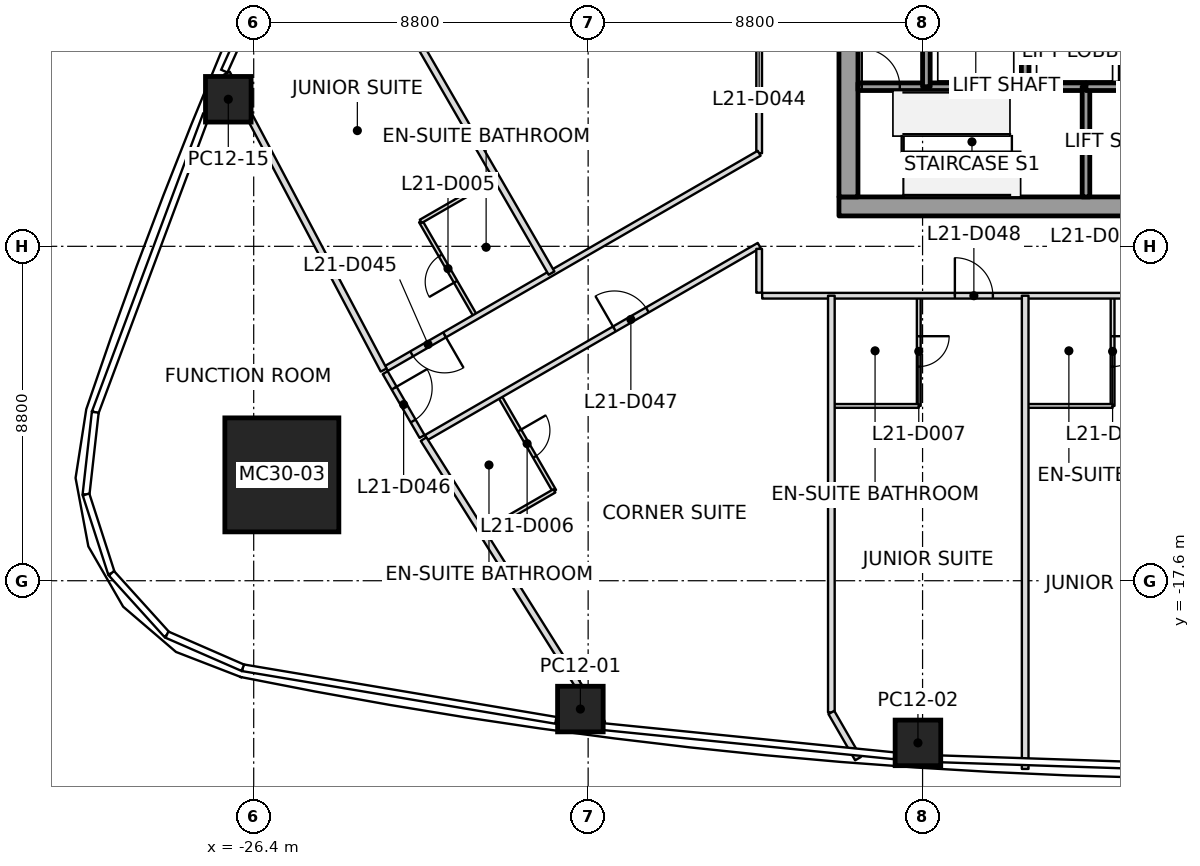
"""IFC4 building model, lengths in metres.
Left out: names, types, materials, properties, quantities, classifications, styles, units other than length and angle.
Written with IfcOpenShell. Run it as: python <this file> out.ifc"""

import sys

from ifc_helpers import new_model, si_unit, direction, frame, frame_2d, origin, origin_2d, place, context, subcontext, project, spatial, rectangle, extrude, element, fill, save


model = new_model("IFC4")
c1 = context("Model", 3, precision=1e-05, world=origin(), true_north=direction((0.0, 1.0)))
c2 = subcontext(c1, "Body", "Model", "MODEL_VIEW")
j1 = project(units=[si_unit("LENGTHUNIT", "METRE"), si_unit("PLANEANGLEUNIT", "RADIAN")], contexts=[c1])
p1 = place(None, origin())
s1 = spatial("IfcSite", under=j1, at=p1, CompositionType="ELEMENT")
p2 = place(p1, origin())
s2 = spatial("IfcBuilding", under=s1, at=p2, CompositionType="ELEMENT")
p3 = place(p2, frame((0.0, 0.0, 99.8)))
s3 = spatial("IfcBuildingStorey", under=s2, at=p3, CompositionType="ELEMENT", Elevation=99.8)
p4 = place(p3, frame((-25.659, -14.814, 0.0), z_axis=(0.030466109479, 0.017607037296, 0.999380712447), x_axis=(0.999535800346, -0.000536667047, -0.03046138236)))
e1 = element("IfcColumn", 1, at=p4, inside=s3, PredefinedType="COLUMN", context=c2, shape_type="SweptSolid", body=[
    extrude(rectangle(XDim=3.0, YDim=3.0, at=origin_2d()), origin(), (0.0, 0.0, 1.0), 3.702),
])
p5 = place(p3, frame((-17.804, -20.977, 0.0), z_axis=(0.019196808933, 0.011346567479, 0.99975133805), x_axis=(-0.99096351093, 0.132982750018, 0.01751879569)))
e2 = element("IfcColumn", 2, at=p5, inside=s3, PredefinedType="COLUMN", context=c2, shape_type="SweptSolid", body=[
    extrude(rectangle(XDim=1.2, YDim=1.2, at=origin_2d()), origin(), (0.0, 0.0, 1.0), 3.701),
])
p6 = place(p3, frame((-8.922, -21.867, 0.0), z_axis=(0.009632635025, 0.012073782257, 0.999880710947), x_axis=(-0.997737791534, 0.066646321699, 0.008807221425)))
e3 = element("IfcColumn", 3, at=p6, inside=s3, PredefinedType="COLUMN", context=c2, shape_type="SweptSolid", body=[
    extrude(rectangle(XDim=1.2, YDim=1.2, at=origin_2d()), origin(), (0.0, 0.0, 1.0), 3.7),
])
p7 = place(p3, frame((-27.069, -4.93, 0.0), z_axis=(0.019394711647, 0.011016723963, 0.999751207528), x_axis=(0.380514646556, 0.924607960976, -0.017570493934)))
e4 = element("IfcColumn", 4, at=p7, inside=s3, PredefinedType="COLUMN", context=c2, shape_type="SweptSolid", body=[
    extrude(rectangle(XDim=1.2, YDim=1.2, at=origin_2d()), origin(), (0.0, 0.0, 1.0), 3.701),
])
p8 = place(p3, frame((-11.0, -7.75, 0.0), z_axis=(0.0, 0.0, 1.0), x_axis=(1.0, 0.0, 0.0)))
e5 = element("IfcWall", 5, at=p8, inside=s3, PredefinedType="SHEAR", context=c2, shape_type="SweptSolid", body=[
    extrude(rectangle(XDim=22.0, YDim=0.5, at=frame_2d((11.0, 0.0))), origin(), (0.0, 0.0, 1.0), 3.7),
])
p9 = place(p8, frame((10.45, 0.0, 0.0)))
e6 = element("IfcOpeningElement", 6, at=p9, cuts=e5, PredefinedType="OPENING", context=c2, shape_type="SweptSolid", body=[
    extrude(rectangle(XDim=1.1, YDim=2.1, at=frame_2d((0.55, 1.05))), frame((0.0, 0.25, 0.0), z_axis=(0.0, -1.0, 0.0), x_axis=(1.0, 0.0, 0.0)), (0.0, 0.0, 1.0), 0.5),
])
p10 = place(p3, frame((-10.75, -7.5, 0.0), z_axis=(0.0, 0.0, 1.0), x_axis=(0.0, 1.0, 0.0)))
e7 = element("IfcWall", 7, at=p10, inside=s3, PredefinedType="SHEAR", context=c2, shape_type="SweptSolid", body=[
    extrude(rectangle(XDim=15.0, YDim=0.5, at=frame_2d((7.5, 0.0))), origin(), (0.0, 0.0, 1.0), 3.7),
])
p11 = place(p10, frame((6.6, 0.0, 0.0)))
e8 = element("IfcOpeningElement", 8, at=p11, cuts=e7, PredefinedType="OPENING", context=c2, shape_type="SweptSolid", body=[
    extrude(rectangle(XDim=1.8, YDim=2.1, at=frame_2d((0.9, 1.05))), frame((0.0, 0.25, 0.0), z_axis=(0.0, -1.0, 0.0), x_axis=(1.0, 0.0, 0.0)), (0.0, 0.0, 1.0), 0.5),
])
p12 = place(p3, frame((-10.5, -4.6, 0.0), z_axis=(0.0, 0.0, 1.0), x_axis=(1.0, 0.0, 0.0)))
e9 = element("IfcWall", 9, at=p12, inside=s3, PredefinedType="SOLIDWALL", context=c2, shape_type="SweptSolid", body=[
    extrude(rectangle(XDim=1.8, YDim=0.2, at=frame_2d((0.9, 0.0))), origin(), (0.0, 0.0, 1.0), 3.55),
])
p13 = place(p12, frame((0.1, 0.0, 0.0)))
e10 = element("IfcOpeningElement", 10, at=p13, cuts=e9, PredefinedType="OPENING", context=c2, shape_type="SweptSolid", body=[
    extrude(rectangle(XDim=1.0, YDim=2.1, at=frame_2d((0.5, 1.05))), frame((0.0, 0.1, 0.0), z_axis=(0.0, -1.0, 0.0), x_axis=(1.0, 0.0, 0.0)), (0.0, 0.0, 1.0), 0.2),
])
p14 = place(p3, frame((-8.7, -4.6, 0.0), z_axis=(0.0, 0.0, 1.0), x_axis=(1.0, 0.0, 0.0)))
e11 = element("IfcWall", 11, at=p14, inside=s3, PredefinedType="SOLIDWALL", context=c2, shape_type="SweptSolid", body=[
    extrude(rectangle(XDim=2.6, YDim=0.2, at=frame_2d((1.3, 0.0))), origin(), (0.0, 0.0, 1.0), 3.55),
])
p15 = place(p3, frame((-8.7, -4.6, 0.0), z_axis=(0.0, 0.0, 1.0), x_axis=(0.0, 1.0, 0.0)))
e12 = element("IfcWall", 12, at=p15, inside=s3, PredefinedType="SOLIDWALL", context=c2, shape_type="SweptSolid", body=[
    extrude(rectangle(XDim=2.8, YDim=0.2, at=frame_2d((1.4, 0.0))), origin(), (0.0, 0.0, 1.0), 3.55),
])
p16 = place(p3, frame((-6.1, -4.6, 0.0), z_axis=(0.0, 0.0, 1.0), x_axis=(1.0, 0.0, 0.0)))
e13 = element("IfcWall", 13, at=p16, inside=s3, PredefinedType="SOLIDWALL", context=c2, shape_type="SweptSolid", body=[
    extrude(rectangle(XDim=1.6, YDim=0.2, at=frame_2d((0.8, 0.0))), origin(), (0.0, 0.0, 1.0), 3.55),
])
p17 = place(p3, frame((-6.1, -4.6, 0.0), z_axis=(0.0, 0.0, 1.0), x_axis=(0.0, 1.0, 0.0)))
e14 = element("IfcWall", 14, at=p17, inside=s3, PredefinedType="SOLIDWALL", context=c2, shape_type="SweptSolid", body=[
    extrude(rectangle(XDim=2.8, YDim=0.2, at=frame_2d((1.4, 0.0))), origin(), (0.0, 0.0, 1.0), 3.55),
])
p18 = place(p3, frame((-4.5, -4.6, 0.0), z_axis=(0.0, 0.0, 1.0), x_axis=(0.0, -1.0, 0.0)))
e15 = element("IfcWall", 15, at=p18, inside=s3, PredefinedType="SOLIDWALL", context=c2, shape_type="SweptSolid", body=[
    extrude(rectangle(XDim=2.9, YDim=0.2, at=frame_2d((1.45, 0.0))), origin(), (0.0, 0.0, 1.0), 3.55),
])
p19 = place(p3, frame((-4.5, -4.6, 0.0), z_axis=(0.0, 0.0, 1.0), x_axis=(1.0, 0.0, 0.0)))
e16 = element("IfcWall", 16, at=p19, inside=s3, PredefinedType="SOLIDWALL", context=c2, shape_type="SweptSolid", body=[
    extrude(rectangle(XDim=1.0, YDim=0.2, at=frame_2d((0.5, 0.0))), origin(), (0.0, 0.0, 1.0), 3.55),
])
p20 = place(p3, frame((-22.98, -12.055, 0.0), z_axis=(0.0, 0.0, 1.0), x_axis=(-0.467349289871, 0.884072757898, 0.0)))
e17 = element("IfcWall", 17, at=p20, inside=s3, PredefinedType="PARTITIONING", context=c2, shape_type="SweptSolid", body=[
    extrude(rectangle(XDim=8.835, YDim=0.175, at=frame_2d((4.417, 0.0))), origin(), (0.0, 0.0, 1.0), 3.0),
])
p21 = place(p3, frame((-18.563, -9.505, 0.0), z_axis=(0.0, 0.0, 1.0), x_axis=(-0.500006767202, 0.866021496703, 0.0)))
e18 = element("IfcWall", 18, at=p21, inside=s3, PredefinedType="PARTITIONING", context=c2, shape_type="SweptSolid", body=[
    extrude(rectangle(XDim=12.587, YDim=0.175, at=frame_2d((6.293, 0.0))), origin(), (0.0, 0.0, 1.0), 2.934),
])
p22 = place(p3, frame((-17.23, -21.355, 0.0), z_axis=(0.0, 0.0, 1.0), x_axis=(-0.53194005048, 0.846782016044, 0.0)))
e19 = element("IfcWall", 19, at=p22, inside=s3, PredefinedType="PARTITIONING", context=c2, shape_type="SweptSolid", body=[
    extrude(rectangle(XDim=8.834, YDim=0.175, at=frame_2d((4.417, 0.0))), origin(), (0.0, 0.0, 1.0), 3.0),
])
p23 = place(p3, frame((-11.2, -10.1, 0.0), z_axis=(0.0, 0.0, 1.0), x_axis=(0.0, -1.0, 0.0)))
e20 = element("IfcWall", 20, at=p23, inside=s3, PredefinedType="PARTITIONING", context=c2, shape_type="SweptSolid", body=[
    extrude(rectangle(XDim=10.967, YDim=0.175, at=frame_2d((5.483, 0.0))), origin(), (0.0, 0.0, 1.0), 3.0),
])
p24 = place(p3, frame((-11.2, -21.067, 0.0), z_axis=(0.0, 0.0, 1.0), x_axis=(0.500068863623, -0.865985641702, 0.0)))
e21 = element("IfcWall", 21, at=p24, inside=s3, PredefinedType="PARTITIONING", context=c2, shape_type="SweptSolid", body=[
    extrude(rectangle(XDim=1.403, YDim=0.175, at=frame_2d((0.702, 0.0))), origin(), (0.0, 0.0, 1.0), 2.934),
])
p25 = place(p3, frame((-6.1, -10.1, 0.0), z_axis=(0.0, 0.0, 1.0), x_axis=(0.0, -1.0, 0.0)))
e22 = element("IfcWall", 22, at=p25, inside=s3, PredefinedType="PARTITIONING", context=c2, shape_type="SweptSolid", body=[
    extrude(rectangle(XDim=12.452, YDim=0.175, at=frame_2d((6.226, 0.0))), origin(), (0.0, 0.0, 1.0), 2.784),
])
p26 = place(p3, frame((-22.94, -12.124, 0.0), z_axis=(0.0, 0.0, 1.0), x_axis=(0.499969367985, -0.866043088465, 0.0)))
e23 = element("IfcWall", 23, at=p26, inside=s3, PredefinedType="PARTITIONING", context=c2, shape_type="SweptSolid", body=[
    extrude(rectangle(XDim=1.94, YDim=0.15, at=frame_2d((0.97, 0.0))), origin(), (0.0, 0.0, 1.0), 2.797),
])
p27 = place(p26, frame((0.47, 0.0, 0.0)))
e24 = element("IfcOpeningElement", 24, at=p27, cuts=e23, PredefinedType="OPENING", context=c2, shape_type="SweptSolid", body=[
    extrude(rectangle(XDim=1.0, YDim=2.1, at=frame_2d((0.5, 1.05))), frame((0.0, 0.075, 0.0), z_axis=(0.0, -1.0, 0.0), x_axis=(1.0, 0.0, 0.0)), (0.0, 0.0, 1.0), 0.15),
])
p28 = place(p3, frame((-13.1, 10.02, 0.0), z_axis=(0.0, 0.0, 1.0), x_axis=(0.0, -1.0, 0.0)))
e25 = element("IfcWall", 25, at=p28, inside=s3, PredefinedType="PARTITIONING", context=c2, shape_type="SweptSolid", body=[
    extrude(rectangle(XDim=16.371, YDim=0.15, at=frame_2d((8.186, 0.0))), origin(), (0.0, 0.0, 1.0), 2.947),
])
p29 = place(p28, frame((2.845, 0.0, 0.0)))
e26 = element("IfcOpeningElement", 26, at=p29, cuts=e25, PredefinedType="OPENING", context=c2, shape_type="SweptSolid", body=[
    extrude(rectangle(XDim=1.0, YDim=2.1, at=frame_2d((0.5, 1.05))), frame((0.0, 0.075, 0.0), z_axis=(0.0, -1.0, 0.0), x_axis=(1.0, 0.0, 0.0)), (0.0, 0.0, 1.0), 0.15),
])
p30 = place(p28, frame((12.271, 0.0, 0.0)))
e27 = element("IfcOpeningElement", 27, at=p30, cuts=e25, PredefinedType="OPENING", context=c2, shape_type="SweptSolid", body=[
    extrude(rectangle(XDim=1.0, YDim=2.1, at=frame_2d((0.5, 1.05))), frame((0.0, 0.075, 0.0), z_axis=(0.0, -1.0, 0.0), x_axis=(1.0, 0.0, 0.0)), (0.0, 0.0, 1.0), 0.15),
])
p31 = place(p3, frame((-13.1, -6.351, 0.0), z_axis=(0.0, 0.0, 1.0), x_axis=(-0.866018341403, -0.500012232204, 0.0)))
e28 = element("IfcWall", 28, at=p31, inside=s3, PredefinedType="PARTITIONING", context=c2, shape_type="SweptSolid", body=[
    extrude(rectangle(XDim=11.328, YDim=0.15, at=frame_2d((5.664, 0.0))), origin(), (0.0, 0.0, 1.0), 2.947),
])
p32 = place(p31, frame((9.559, 0.0, 0.0)))
e29 = element("IfcOpeningElement", 29, at=p32, cuts=e28, PredefinedType="OPENING", context=c2, shape_type="SweptSolid", body=[
    extrude(rectangle(XDim=1.0, YDim=2.1, at=frame_2d((0.5, 1.05))), frame((0.0, 0.075, 0.0), z_axis=(0.0, -1.0, 0.0), x_axis=(1.0, 0.0, 0.0)), (0.0, 0.0, 1.0), 0.15),
])
p33 = place(p3, frame((-21.861, -13.834, 0.0), z_axis=(0.0, 0.0, 1.0), x_axis=(0.866015577098, 0.500017019934, 0.0)))
e30 = element("IfcWall", 30, at=p33, inside=s3, PredefinedType="PARTITIONING", context=c2, shape_type="SweptSolid", body=[
    extrude(rectangle(XDim=10.116, YDim=0.15, at=frame_2d((5.058, 0.0))), origin(), (0.0, 0.0, 1.0), 2.797),
])
p34 = place(p33, frame((5.718, 0.0, 0.0)))
e31 = element("IfcOpeningElement", 31, at=p34, cuts=e30, PredefinedType="OPENING", context=c2, shape_type="SweptSolid", body=[
    extrude(rectangle(XDim=1.0, YDim=2.1, at=frame_2d((0.5, 1.05))), frame((0.0, 0.075, 0.0), z_axis=(0.0, -1.0, 0.0), x_axis=(1.0, 0.0, 0.0)), (0.0, 0.0, 1.0), 0.15),
])
p35 = place(p3, frame((-13.1, -8.867, 0.0), z_axis=(0.0, 0.0, 1.0), x_axis=(0.0, -1.0, 0.0)))
e32 = element("IfcWall", 32, at=p35, inside=s3, PredefinedType="PARTITIONING", context=c2, shape_type="SweptSolid", body=[
    extrude(rectangle(XDim=1.153, YDim=0.15, at=frame_2d((0.576, 0.0))), origin(), (0.0, 0.0, 1.0), 2.797),
])
p36 = place(p3, frame((-13.02, -10.1, 0.0), z_axis=(0.0, 0.0, 1.0), x_axis=(1.0, 0.0, 0.0)))
e33 = element("IfcWall", 33, at=p36, inside=s3, PredefinedType="PARTITIONING", context=c2, shape_type="SweptSolid", body=[
    extrude(rectangle(XDim=26.04, YDim=0.15, at=frame_2d((13.02, 0.0))), origin(), (0.0, 0.0, 1.0), 2.867),
])
p37 = place(p36, frame((5.07, 0.0, 0.0)))
e34 = element("IfcOpeningElement", 34, at=p37, cuts=e33, PredefinedType="OPENING", context=c2, shape_type="SweptSolid", body=[
    extrude(rectangle(XDim=1.0, YDim=2.1, at=frame_2d((0.5, 1.05))), frame((0.0, 0.075, 0.0), z_axis=(0.0, -1.0, 0.0), x_axis=(1.0, 0.0, 0.0)), (0.0, 0.0, 1.0), 0.15),
])
p38 = place(p36, frame((9.87, 0.0, 0.0)))
e35 = element("IfcOpeningElement", 35, at=p38, cuts=e33, PredefinedType="OPENING", context=c2, shape_type="SweptSolid", body=[
    extrude(rectangle(XDim=1.0, YDim=2.1, at=frame_2d((0.5, 1.05))), frame((0.0, 0.075, 0.0), z_axis=(0.0, -1.0, 0.0), x_axis=(1.0, 0.0, 0.0)), (0.0, 0.0, 1.0), 0.15),
])
p39 = place(p36, frame((14.67, 0.0, 0.0)))
e36 = element("IfcOpeningElement", 36, at=p39, cuts=e33, PredefinedType="OPENING", context=c2, shape_type="SweptSolid", body=[
    extrude(rectangle(XDim=1.0, YDim=2.1, at=frame_2d((0.5, 1.05))), frame((0.0, 0.075, 0.0), z_axis=(0.0, -1.0, 0.0), x_axis=(1.0, 0.0, 0.0)), (0.0, 0.0, 1.0), 0.15),
])
p40 = place(p36, frame((19.47, 0.0, 0.0)))
e37 = element("IfcOpeningElement", 37, at=p40, cuts=e33, PredefinedType="OPENING", context=c2, shape_type="SweptSolid", body=[
    extrude(rectangle(XDim=1.0, YDim=2.1, at=frame_2d((0.5, 1.05))), frame((0.0, 0.075, 0.0), z_axis=(0.0, -1.0, 0.0), x_axis=(1.0, 0.0, 0.0)), (0.0, 0.0, 1.0), 0.15),
])
p41 = place(p36, frame((24.27, 0.0, 0.0)))
e38 = element("IfcOpeningElement", 38, at=p41, cuts=e33, PredefinedType="OPENING", context=c2, shape_type="SweptSolid", body=[
    extrude(rectangle(XDim=1.0, YDim=2.1, at=frame_2d((0.5, 1.05))), frame((0.0, 0.075, 0.0), z_axis=(0.0, -1.0, 0.0), x_axis=(1.0, 0.0, 0.0)), (0.0, 0.0, 1.0), 0.15),
])
p42 = place(p3, frame((-20.57, -10.629, 0.0), z_axis=(0.0, 0.0, 1.0), x_axis=(-0.499999802827, 0.866025517622, 0.0)))
e39 = element("IfcWall", 39, at=p42, inside=s3, PredefinedType="PARTITIONING", context=c2, shape_type="SweptSolid", body=[
    extrude(rectangle(XDim=2.87, YDim=0.1, at=frame_2d((1.435, 0.0))), origin(), (0.0, 0.0, 1.0), 3.0),
])
p43 = place(p42, frame((1.035, 0.0, 0.0)))
e40 = element("IfcOpeningElement", 40, at=p43, cuts=e39, PredefinedType="OPENING", context=c2, shape_type="SweptSolid", body=[
    extrude(rectangle(XDim=0.8, YDim=2.1, at=frame_2d((0.4, 1.05))), frame((0.0, 0.05, 0.0), z_axis=(0.0, -1.0, 0.0), x_axis=(1.0, 0.0, 0.0)), (0.0, 0.0, 1.0), 0.1),
])
p44 = place(p3, frame((-22.005, -8.144, 0.0), z_axis=(0.0, 0.0, 1.0), x_axis=(0.866017224141, 0.500014167291, 0.0)))
e41 = element("IfcWall", 41, at=p44, inside=s3, PredefinedType="PARTITIONING", context=c2, shape_type="SweptSolid", body=[
    extrude(rectangle(XDim=2.27, YDim=0.1, at=frame_2d((1.135, 0.0))), origin(), (0.0, 0.0, 1.0), 3.0),
])
p45 = place(p3, frame((-19.923, -12.75, 0.0), z_axis=(0.0, 0.0, 1.0), x_axis=(0.500036638401, -0.866004249561, 0.0)))
e42 = element("IfcWall", 42, at=p45, inside=s3, PredefinedType="PARTITIONING", context=c2, shape_type="SweptSolid", body=[
    extrude(rectangle(XDim=2.87, YDim=0.1, at=frame_2d((1.435, 0.0))), origin(), (0.0, 0.0, 1.0), 3.0),
])
p46 = place(p45, frame((1.035, 0.0, 0.0)))
e43 = element("IfcOpeningElement", 43, at=p46, cuts=e42, PredefinedType="OPENING", context=c2, shape_type="SweptSolid", body=[
    extrude(rectangle(XDim=0.8, YDim=2.1, at=frame_2d((0.4, 1.05))), frame((0.0, 0.05, 0.0), z_axis=(0.0, -1.0, 0.0), x_axis=(1.0, 0.0, 0.0)), (0.0, 0.0, 1.0), 0.1),
])
p47 = place(p3, frame((-18.488, -15.235, 0.0), z_axis=(0.0, 0.0, 1.0), x_axis=(-0.866044110172, -0.499967598186, 0.0)))
e44 = element("IfcWall", 44, at=p47, inside=s3, PredefinedType="PARTITIONING", context=c2, shape_type="SweptSolid", body=[
    extrude(rectangle(XDim=2.27, YDim=0.1, at=frame_2d((1.135, 0.0))), origin(), (0.0, 0.0, 1.0), 3.0),
])
p48 = place(p3, frame((-8.9, -10.13, 0.0), z_axis=(0.0, 0.0, 1.0), x_axis=(0.0, -1.0, 0.0)))
e45 = element("IfcWall", 45, at=p48, inside=s3, PredefinedType="PARTITIONING", context=c2, shape_type="SweptSolid", body=[
    extrude(rectangle(XDim=2.87, YDim=0.1, at=frame_2d((1.435, 0.0))), origin(), (0.0, 0.0, 1.0), 3.0),
])
p49 = place(p48, frame((1.035, 0.0, 0.0)))
e46 = element("IfcOpeningElement", 46, at=p49, cuts=e45, PredefinedType="OPENING", context=c2, shape_type="SweptSolid", body=[
    extrude(rectangle(XDim=0.8, YDim=2.1, at=frame_2d((0.4, 1.05))), frame((0.0, 0.05, 0.0), z_axis=(0.0, -1.0, 0.0), x_axis=(1.0, 0.0, 0.0)), (0.0, 0.0, 1.0), 0.1),
])
p50 = place(p3, frame((-8.9, -13.0, 0.0), z_axis=(0.0, 0.0, 1.0), x_axis=(-1.0, 0.0, 0.0)))
e47 = element("IfcWall", 47, at=p50, inside=s3, PredefinedType="PARTITIONING", context=c2, shape_type="SweptSolid", body=[
    extrude(rectangle(XDim=2.27, YDim=0.1, at=frame_2d((1.135, 0.0))), origin(), (0.0, 0.0, 1.0), 3.0),
])
p51 = place(p3, frame((-3.8, -10.13, 0.0), z_axis=(0.0, 0.0, 1.0), x_axis=(0.0, -1.0, 0.0)))
e48 = element("IfcWall", 48, at=p51, inside=s3, PredefinedType="PARTITIONING", context=c2, shape_type="SweptSolid", body=[
    extrude(rectangle(XDim=2.87, YDim=0.1, at=frame_2d((1.435, 0.0))), origin(), (0.0, 0.0, 1.0), 3.0),
])
p52 = place(p51, frame((1.035, 0.0, 0.0)))
e49 = element("IfcOpeningElement", 49, at=p52, cuts=e48, PredefinedType="OPENING", context=c2, shape_type="SweptSolid", body=[
    extrude(rectangle(XDim=0.8, YDim=2.1, at=frame_2d((0.4, 1.05))), frame((0.0, 0.05, 0.0), z_axis=(0.0, -1.0, 0.0), x_axis=(1.0, 0.0, 0.0)), (0.0, 0.0, 1.0), 0.1),
])
p53 = place(p3, frame((-3.8, -13.0, 0.0), z_axis=(0.0, 0.0, 1.0), x_axis=(-1.0, 0.0, 0.0)))
e50 = element("IfcWall", 50, at=p53, inside=s3, PredefinedType="PARTITIONING", context=c2, shape_type="SweptSolid", body=[
    extrude(rectangle(XDim=2.27, YDim=0.1, at=frame_2d((1.135, 0.0))), origin(), (0.0, 0.0, 1.0), 3.0),
])
p54 = place(p32, origin())
e51 = element("IfcDoor", 51, at=p54, inside=s3, OperationType="SINGLE_SWING_LEFT", PredefinedType="DOOR", context=c2, shape_type="SweptSolid", body=[
    extrude(rectangle(XDim=1.0, YDim=2.1, at=frame_2d((0.5, 1.05))), frame((0.0, 0.025, 0.0), z_axis=(0.0, -1.0, 0.0), x_axis=(1.0, 0.0, 0.0)), (0.0, 0.0, 1.0), 0.05),
])
fill(e29, e51)
p55 = place(p43, origin())
e52 = element("IfcDoor", 52, at=p55, inside=s3, OperationType="SINGLE_SWING_LEFT", PredefinedType="DOOR", context=c2, shape_type="SweptSolid", body=[
    extrude(rectangle(XDim=0.8, YDim=2.1, at=frame_2d((0.4, 1.05))), frame((0.0, 0.025, 0.0), z_axis=(0.0, -1.0, 0.0), x_axis=(1.0, 0.0, 0.0)), (0.0, 0.0, 1.0), 0.05),
])
fill(e40, e52)
p56 = place(p27, origin())
e53 = element("IfcDoor", 53, at=p56, inside=s3, OperationType="SINGLE_SWING_LEFT", PredefinedType="DOOR", context=c2, shape_type="SweptSolid", body=[
    extrude(rectangle(XDim=1.0, YDim=2.1, at=frame_2d((0.5, 1.05))), frame((0.0, 0.025, 0.0), z_axis=(0.0, -1.0, 0.0), x_axis=(1.0, 0.0, 0.0)), (0.0, 0.0, 1.0), 0.05),
])
fill(e24, e53)
p57 = place(p34, origin())
e54 = element("IfcDoor", 54, at=p57, inside=s3, OperationType="SINGLE_SWING_LEFT", PredefinedType="DOOR", context=c2, shape_type="SweptSolid", body=[
    extrude(rectangle(XDim=1.0, YDim=2.1, at=frame_2d((0.5, 1.05))), frame((0.0, 0.025, 0.0), z_axis=(0.0, -1.0, 0.0), x_axis=(1.0, 0.0, 0.0)), (0.0, 0.0, 1.0), 0.05),
])
fill(e31, e54)
p58 = place(p46, origin())
e55 = element("IfcDoor", 55, at=p58, inside=s3, OperationType="SINGLE_SWING_LEFT", PredefinedType="DOOR", context=c2, shape_type="SweptSolid", body=[
    extrude(rectangle(XDim=0.8, YDim=2.1, at=frame_2d((0.4, 1.05))), frame((0.0, 0.025, 0.0), z_axis=(0.0, -1.0, 0.0), x_axis=(1.0, 0.0, 0.0)), (0.0, 0.0, 1.0), 0.05),
])
fill(e43, e55)
p59 = place(p37, origin())
e56 = element("IfcDoor", 56, at=p59, inside=s3, OperationType="SINGLE_SWING_LEFT", PredefinedType="DOOR", context=c2, shape_type="SweptSolid", body=[
    extrude(rectangle(XDim=1.0, YDim=2.1, at=frame_2d((0.5, 1.05))), frame((0.0, 0.025, 0.0), z_axis=(0.0, -1.0, 0.0), x_axis=(1.0, 0.0, 0.0)), (0.0, 0.0, 1.0), 0.05),
])
fill(e34, e56)
p60 = place(p49, origin())
e57 = element("IfcDoor", 57, at=p60, inside=s3, OperationType="SINGLE_SWING_RIGHT", PredefinedType="DOOR", context=c2, shape_type="SweptSolid", body=[
    extrude(rectangle(XDim=0.8, YDim=2.1, at=frame_2d((0.4, 1.05))), frame((0.0, 0.025, 0.0), z_axis=(0.0, -1.0, 0.0), x_axis=(1.0, 0.0, 0.0)), (0.0, 0.0, 1.0), 0.05),
])
fill(e46, e57)
p61 = place(p52, origin())
e58 = element("IfcDoor", 58, at=p61, inside=s3, OperationType="SINGLE_SWING_LEFT", PredefinedType="DOOR", context=c2, shape_type="SweptSolid", body=[
    extrude(rectangle(XDim=0.8, YDim=2.1, at=frame_2d((0.4, 1.05))), frame((0.0, 0.025, 0.0), z_axis=(0.0, -1.0, 0.0), x_axis=(1.0, 0.0, 0.0)), (0.0, 0.0, 1.0), 0.05),
])
fill(e49, e58)
p62 = place(p13, origin())
e59 = element("IfcDoor", 59, at=p62, inside=s3, OperationType="SINGLE_SWING_LEFT", PredefinedType="DOOR", context=c2, shape_type="SweptSolid", body=[
    extrude(rectangle(XDim=1.0, YDim=2.1, at=frame_2d((0.5, 1.05))), frame((0.0, 0.025, 0.0), z_axis=(0.0, -1.0, 0.0), x_axis=(1.0, 0.0, 0.0)), (0.0, 0.0, 1.0), 0.05),
])
fill(e10, e59)
save(model, sys.argv[1])
